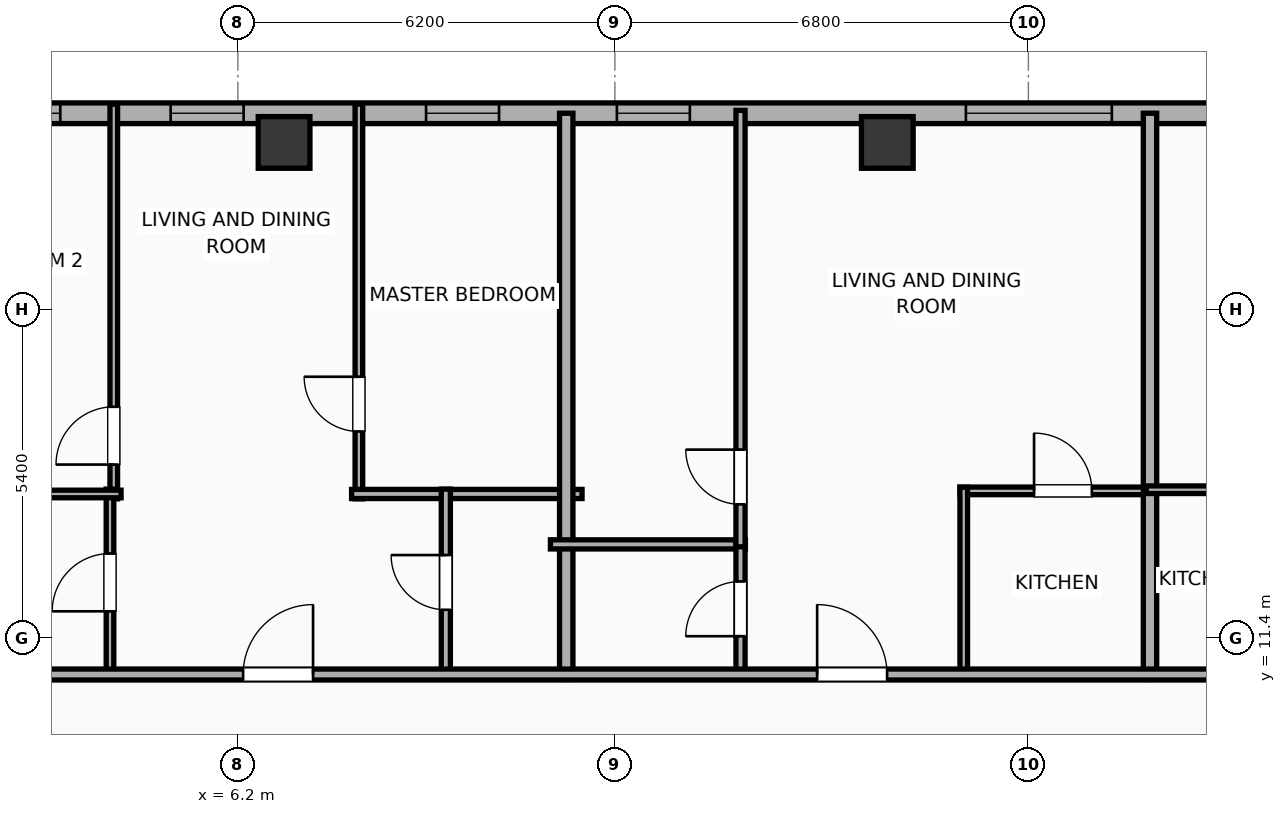
"""IFC4 building model, lengths in metres.
Left out: names, types, materials, properties, quantities, classifications, styles, units other than length and angle.
Written with IfcOpenShell. Run it as: python <this file> out.ifc"""

import sys

from ifc_helpers import new_model, si_unit, direction, frame, frame_2d, origin, origin_2d, place, context, subcontext, project, spatial, rectangle, hollow_rectangle, extrude, element, fill, save


model = new_model("IFC4")
c1 = context("Model", 3, precision=1e-05, world=origin(), true_north=direction((0.0, 1.0)))
c2 = subcontext(c1, "Body", "Model", "MODEL_VIEW")
j1 = project(units=[si_unit("LENGTHUNIT", "METRE"), si_unit("PLANEANGLEUNIT", "RADIAN")], contexts=[c1])
p1 = place(None, origin())
s1 = spatial("IfcSite", under=j1, at=p1, CompositionType="ELEMENT")
p2 = place(p1, origin())
s2 = spatial("IfcBuilding", under=s1, at=p2, CompositionType="ELEMENT")
p3 = place(p2, frame((0.0, 0.0, 223.6)))
s3 = spatial("IfcBuildingStorey", under=s2, at=p3, CompositionType="ELEMENT", Elevation=223.6)
for number, where, z_axis, x_axis in (
    (1, (16.88, 19.55, 0.0), (0.0, 0.0, 1.0), (1.0, 0.0, 0.0)),
    (2, (6.96, 19.55, 0.0), (0.0, 0.0, 1.0), (1.0, 0.0, 0.0)),
):
    element("IfcColumn", number, at=place(p3, frame(where, z_axis=z_axis, x_axis=x_axis)), inside=s3, PredefinedType="COLUMN", context=c2, shape_type="SweptSolid", body=[
        extrude(hollow_rectangle(XDim=0.85, YDim=0.85, WallThickness=0.028, at=origin_2d()), origin(), (0.0, 0.0, 1.0), 3.9),
    ])
p4 = place(p3, frame((-22.783, 20.03, 0.0), z_axis=(0.0, 0.0, 1.0), x_axis=(1.0, 0.0, 0.0)))
e3 = element("IfcWall", 3, at=p4, inside=s3, PredefinedType="ELEMENTEDWALL", context=c2, shape_type="SweptSolid", body=[
    extrude(rectangle(XDim=49.566, YDim=0.34, at=frame_2d((24.783, 0.0))), origin(), (0.0, 0.0, 1.0), 3.65),
])
p5 = place(p4, frame((40.956, 0.0, 0.75)))
e4 = element("IfcOpeningElement", 4, at=p5, cuts=e3, PredefinedType="OPENING", context=c2, shape_type="SweptSolid", body=[
    extrude(rectangle(XDim=2.4, YDim=2.1, at=frame_2d((1.2, 1.05))), frame((0.0, 0.18, 0.0), z_axis=(0.0, -1.0, 0.0), x_axis=(1.0, 0.0, 0.0)), (0.0, 0.0, 1.0), 0.36),
])
p6 = place(p4, frame((1.437, 0.0, 0.75)))
e5 = element("IfcOpeningElement", 5, at=p6, cuts=e3, PredefinedType="OPENING", context=c2, shape_type="SweptSolid", body=[
    extrude(rectangle(XDim=1.2, YDim=2.05, at=frame_2d((0.6, 1.025))), frame((0.0, 0.18, 0.0), z_axis=(0.0, -1.0, 0.0), x_axis=(1.0, 0.0, 0.0)), (0.0, 0.0, 1.0), 0.36),
])
p7 = place(p4, frame((7.619, 0.0, 0.75)))
e6 = element("IfcOpeningElement", 6, at=p7, cuts=e3, PredefinedType="OPENING", context=c2, shape_type="SweptSolid", body=[
    extrude(rectangle(XDim=1.2, YDim=2.05, at=frame_2d((0.6, 1.025))), frame((0.0, 0.18, 0.0), z_axis=(0.0, -1.0, 0.0), x_axis=(1.0, 0.0, 0.0)), (0.0, 0.0, 1.0), 0.36),
])
p8 = place(p4, frame((4.124, 0.0, 0.75)))
e7 = element("IfcOpeningElement", 7, at=p8, cuts=e3, PredefinedType="OPENING", context=c2, shape_type="SweptSolid", body=[
    extrude(rectangle(XDim=1.2, YDim=2.05, at=frame_2d((0.6, 1.025))), frame((0.0, 0.18, 0.0), z_axis=(0.0, -1.0, 0.0), x_axis=(1.0, 0.0, 0.0)), (0.0, 0.0, 1.0), 0.36),
])
p9 = place(p4, frame((11.278, 0.0, 0.75)))
e8 = element("IfcOpeningElement", 8, at=p9, cuts=e3, PredefinedType="OPENING", context=c2, shape_type="SweptSolid", body=[
    extrude(rectangle(XDim=1.2, YDim=2.05, at=frame_2d((0.6, 1.025))), frame((0.0, 0.18, 0.0), z_axis=(0.0, -1.0, 0.0), x_axis=(1.0, 0.0, 0.0)), (0.0, 0.0, 1.0), 0.36),
])
p10 = place(p4, frame((17.953, 0.0, 0.75)))
e9 = element("IfcOpeningElement", 9, at=p10, cuts=e3, PredefinedType="OPENING", context=c2, shape_type="SweptSolid", body=[
    extrude(rectangle(XDim=1.2, YDim=2.05, at=frame_2d((0.6, 1.025))), frame((0.0, 0.18, 0.0), z_axis=(0.0, -1.0, 0.0), x_axis=(1.0, 0.0, 0.0)), (0.0, 0.0, 1.0), 0.36),
])
p11 = place(p4, frame((14.738, 0.0, 0.75)))
e10 = element("IfcOpeningElement", 10, at=p11, cuts=e3, PredefinedType="OPENING", context=c2, shape_type="SweptSolid", body=[
    extrude(rectangle(XDim=1.2, YDim=2.05, at=frame_2d((0.6, 1.025))), frame((0.0, 0.18, 0.0), z_axis=(0.0, -1.0, 0.0), x_axis=(1.0, 0.0, 0.0)), (0.0, 0.0, 1.0), 0.36),
])
p12 = place(p4, frame((21.878, 0.0, 0.75)))
e11 = element("IfcOpeningElement", 11, at=p12, cuts=e3, PredefinedType="OPENING", context=c2, shape_type="SweptSolid", body=[
    extrude(rectangle(XDim=1.2, YDim=2.05, at=frame_2d((0.6, 1.025))), frame((0.0, 0.18, 0.0), z_axis=(0.0, -1.0, 0.0), x_axis=(1.0, 0.0, 0.0)), (0.0, 0.0, 1.0), 0.36),
])
p13 = place(p4, frame((27.878, 0.0, 0.75)))
e12 = element("IfcOpeningElement", 12, at=p13, cuts=e3, PredefinedType="OPENING", context=c2, shape_type="SweptSolid", body=[
    extrude(rectangle(XDim=1.2, YDim=2.05, at=frame_2d((0.6, 1.025))), frame((0.0, 0.18, 0.0), z_axis=(0.0, -1.0, 0.0), x_axis=(1.0, 0.0, 0.0)), (0.0, 0.0, 1.0), 0.36),
])
p14 = place(p4, frame((24.863, 0.0, 0.75)))
e13 = element("IfcOpeningElement", 13, at=p14, cuts=e3, PredefinedType="OPENING", context=c2, shape_type="SweptSolid", body=[
    extrude(rectangle(XDim=1.2, YDim=2.05, at=frame_2d((0.6, 1.025))), frame((0.0, 0.18, 0.0), z_axis=(0.0, -1.0, 0.0), x_axis=(1.0, 0.0, 0.0)), (0.0, 0.0, 1.0), 0.36),
])
p15 = place(p4, frame((32.078, 0.0, 0.75)))
e14 = element("IfcOpeningElement", 14, at=p15, cuts=e3, PredefinedType="OPENING", context=c2, shape_type="SweptSolid", body=[
    extrude(rectangle(XDim=1.2, YDim=2.05, at=frame_2d((0.6, 1.025))), frame((0.0, 0.18, 0.0), z_axis=(0.0, -1.0, 0.0), x_axis=(1.0, 0.0, 0.0)), (0.0, 0.0, 1.0), 0.36),
])
p16 = place(p4, frame((35.216, 0.0, 0.75)))
e15 = element("IfcOpeningElement", 15, at=p16, cuts=e3, PredefinedType="OPENING", context=c2, shape_type="SweptSolid", body=[
    extrude(rectangle(XDim=1.2, YDim=2.05, at=frame_2d((0.6, 1.025))), frame((0.0, 0.18, 0.0), z_axis=(0.0, -1.0, 0.0), x_axis=(1.0, 0.0, 0.0)), (0.0, 0.0, 1.0), 0.36),
])
p17 = place(p4, frame((45.73, 0.0, 0.75)))
e16 = element("IfcOpeningElement", 16, at=p17, cuts=e3, PredefinedType="OPENING", context=c2, shape_type="SweptSolid", body=[
    extrude(rectangle(XDim=1.2, YDim=2.05, at=frame_2d((0.6, 1.025))), frame((0.0, 0.18, 0.0), z_axis=(0.0, -1.0, 0.0), x_axis=(1.0, 0.0, 0.0)), (0.0, 0.0, 1.0), 0.36),
])
p18 = place(p3, frame((4.159, 13.689, 0.0), z_axis=(0.0, 0.0, 1.0), x_axis=(0.0, 1.0, 0.0)))
e17 = element("IfcWall", 17, at=p18, inside=s3, PredefinedType="PARTITIONING", context=c2, shape_type="SweptSolid", body=[
    extrude(rectangle(XDim=6.491, YDim=0.125, at=frame_2d((3.246, 0.0))), origin(), (0.0, 0.0, 1.0), 3.65),
])
p19 = place(p18, frame((0.564, 0.0, 0.0)))
e18 = element("IfcOpeningElement", 18, at=p19, cuts=e17, PredefinedType="OPENING", context=c2, shape_type="SweptSolid", body=[
    extrude(rectangle(XDim=0.95, YDim=2.05, at=frame_2d((0.475, 1.025))), frame((0.0, 0.073, 0.0), z_axis=(0.0, -1.0, 0.0), x_axis=(1.0, 0.0, 0.0)), (0.0, 0.0, 1.0), 0.145),
])
p20 = place(p3, frame((8.19, 13.689, 0.0), z_axis=(0.0, 0.0, 1.0), x_axis=(0.0, 1.0, 0.0)))
e19 = element("IfcWall", 19, at=p20, inside=s3, PredefinedType="PARTITIONING", context=c2, shape_type="SweptSolid", body=[
    extrude(rectangle(XDim=6.491, YDim=0.125, at=frame_2d((3.246, 0.0))), origin(), (0.0, 0.0, 1.0), 3.65),
])
p21 = place(p20, frame((1.108, 0.0, 0.0)))
e20 = element("IfcOpeningElement", 20, at=p21, cuts=e19, PredefinedType="OPENING", context=c2, shape_type="SweptSolid", body=[
    extrude(rectangle(XDim=0.9, YDim=2.05, at=frame_2d((0.45, 1.025))), frame((0.0, 0.073, 0.0), z_axis=(0.0, -1.0, 0.0), x_axis=(1.0, 0.0, 0.0)), (0.0, 0.0, 1.0), 0.145),
])
p22 = place(p3, frame((8.07, 13.769, 0.0), z_axis=(0.0, 0.0, 1.0), x_axis=(1.0, 0.0, 0.0)))
e21 = element("IfcWall", 21, at=p22, inside=s3, PredefinedType="PLUMBINGWALL", context=c2, shape_type="SweptSolid", body=[
    extrude(rectangle(XDim=3.79, YDim=0.15, at=frame_2d((1.895, 0.0))), origin(), (0.0, 0.0, 1.0), 3.65),
])
p23 = place(p3, frame((4.097, 10.78, 0.0), z_axis=(0.0, 0.0, 1.0), x_axis=(0.0, 1.0, 0.0)))
e22 = element("IfcWall", 22, at=p23, inside=s3, PredefinedType="PARTITIONING", context=c2, shape_type="SweptSolid", body=[
    extrude(rectangle(XDim=3.069, YDim=0.125, at=frame_2d((1.535, 0.0))), origin(), (0.0, 0.0, 1.0), 3.65),
])
p24 = place(p23, frame((1.06, 0.0, 0.0)))
e23 = element("IfcOpeningElement", 23, at=p24, cuts=e22, PredefinedType="OPENING", context=c2, shape_type="SweptSolid", body=[
    extrude(rectangle(XDim=0.95, YDim=2.05, at=frame_2d((0.475, 1.025))), frame((0.0, 0.073, 0.0), z_axis=(0.0, -1.0, 0.0), x_axis=(1.0, 0.0, 0.0)), (0.0, 0.0, 1.0), 0.145),
])
p25 = place(p3, frame((0.94, 13.769, 0.0), z_axis=(0.0, 0.0, 1.0), x_axis=(1.0, 0.0, 0.0)))
e24 = element("IfcWall", 24, at=p25, inside=s3, PredefinedType="PARTITIONING", context=c2, shape_type="SweptSolid", body=[
    extrude(rectangle(XDim=3.339, YDim=0.125, at=frame_2d((1.669, 0.0))), origin(), (0.0, 0.0, 1.0), 3.65),
])
p26 = place(p3, frame((9.62, 10.78, 0.0), z_axis=(0.0, 0.0, 1.0), x_axis=(0.0, 1.0, 0.0)))
e25 = element("IfcWall", 25, at=p26, inside=s3, PredefinedType="PLUMBINGWALL", context=c2, shape_type="SweptSolid", body=[
    extrude(rectangle(XDim=3.069, YDim=0.15, at=frame_2d((1.535, 0.0))), origin(), (0.0, 0.0, 1.0), 3.65),
])
p27 = place(p26, frame((1.084, 0.0, 0.0)))
e26 = element("IfcOpeningElement", 26, at=p27, cuts=e25, PredefinedType="OPENING", context=c2, shape_type="SweptSolid", body=[
    extrude(rectangle(XDim=0.9, YDim=2.05, at=frame_2d((0.45, 1.025))), frame((0.0, 0.085, 0.0), z_axis=(0.0, -1.0, 0.0), x_axis=(1.0, 0.0, 0.0)), (0.0, 0.0, 1.0), 0.17),
])
p28 = place(p3, frame((11.6, 10.72, 0.0), z_axis=(0.0, 0.0, 1.0), x_axis=(0.0, 1.0, 0.0)))
e27 = element("IfcWall", 27, at=p28, inside=s3, PredefinedType="PARTITIONING", context=c2, shape_type="SweptSolid", body=[
    extrude(rectangle(XDim=9.31, YDim=0.22, at=frame_2d((4.655, 0.0))), origin(), (0.0, 0.0, 1.0), 3.65),
])
p29 = place(p3, frame((11.34, 12.94, 0.0), z_axis=(0.0, 0.0, 1.0), x_axis=(1.0, 0.0, 0.0)))
e28 = element("IfcWall", 28, at=p29, inside=s3, PredefinedType="PLUMBINGWALL", context=c2, shape_type="SweptSolid", body=[
    extrude(rectangle(XDim=3.206, YDim=0.15, at=frame_2d((1.603, 0.0))), origin(), (0.0, 0.0, 1.0), 3.65),
])
p30 = place(p3, frame((14.466, 10.78, 0.0), z_axis=(0.0, 0.0, 1.0), x_axis=(0.0, 1.0, 0.0)))
e29 = element("IfcWall", 29, at=p30, inside=s3, PredefinedType="PLUMBINGWALL", context=c2, shape_type="SweptSolid", body=[
    extrude(rectangle(XDim=2.2, YDim=0.15, at=frame_2d((1.1, 0.0))), origin(), (0.0, 0.0, 1.0), 3.65),
])
p31 = place(p30, frame((0.65, 0.0, 0.0)))
e30 = element("IfcOpeningElement", 30, at=p31, cuts=e29, PredefinedType="OPENING", context=c2, shape_type="SweptSolid", body=[
    extrude(rectangle(XDim=0.9, YDim=2.05, at=frame_2d((0.45, 1.025))), frame((0.0, 0.085, 0.0), z_axis=(0.0, -1.0, 0.0), x_axis=(1.0, 0.0, 0.0)), (0.0, 0.0, 1.0), 0.17),
])
p32 = place(p3, frame((14.466, 12.9, 0.0), z_axis=(0.0, 0.0, 1.0), x_axis=(0.0, 1.0, 0.0)))
e31 = element("IfcWall", 31, at=p32, inside=s3, PredefinedType="PLUMBINGWALL", context=c2, shape_type="SweptSolid", body=[
    extrude(rectangle(XDim=7.177, YDim=0.15, at=frame_2d((3.588, 0.0))), origin(), (0.0, 0.0, 1.0), 3.65),
])
p33 = place(p32, frame((0.698, 0.0, 0.0)))
e32 = element("IfcOpeningElement", 32, at=p33, cuts=e31, PredefinedType="OPENING", context=c2, shape_type="SweptSolid", body=[
    extrude(rectangle(XDim=0.9, YDim=2.05, at=frame_2d((0.45, 1.025))), frame((0.0, 0.085, 0.0), z_axis=(0.0, -1.0, 0.0), x_axis=(1.0, 0.0, 0.0)), (0.0, 0.0, 1.0), 0.17),
])
p34 = place(p3, frame((18.077, 13.82, 0.0), z_axis=(0.0, 0.0, 1.0), x_axis=(1.0, 0.0, 0.0)))
e33 = element("IfcWall", 33, at=p34, inside=s3, PredefinedType="PARTITIONING", context=c2, shape_type="SweptSolid", body=[
    extrude(rectangle(XDim=3.186, YDim=0.125, at=frame_2d((1.593, 0.0))), origin(), (0.0, 0.0, 1.0), 3.65),
])
p35 = place(p34, frame((1.217, 0.0, 0.0)))
e34 = element("IfcOpeningElement", 34, at=p35, cuts=e33, PredefinedType="OPENING", context=c2, shape_type="SweptSolid", body=[
    extrude(rectangle(XDim=0.95, YDim=2.05, at=frame_2d((0.475, 1.025))), frame((0.0, 0.073, 0.0), z_axis=(0.0, -1.0, 0.0), x_axis=(1.0, 0.0, 0.0)), (0.0, 0.0, 1.0), 0.145),
])
p36 = place(p3, frame((18.137, 10.78, 0.0), z_axis=(0.0, 0.0, 1.0), x_axis=(0.0, 1.0, 0.0)))
e35 = element("IfcWall", 35, at=p36, inside=s3, PredefinedType="PARTITIONING", context=c2, shape_type="SweptSolid", body=[
    extrude(rectangle(XDim=3.1, YDim=0.125, at=frame_2d((1.55, 0.0))), origin(), (0.0, 0.0, 1.0), 3.65),
])
p37 = place(p3, frame((21.2, 10.72, 0.0), z_axis=(0.0, 0.0, 1.0), x_axis=(0.0, 1.0, 0.0)))
e36 = element("IfcWall", 36, at=p37, inside=s3, PredefinedType="PARTITIONING", context=c2, shape_type="SweptSolid", body=[
    extrude(rectangle(XDim=9.31, YDim=0.22, at=frame_2d((4.655, 0.0))), origin(), (0.0, 0.0, 1.0), 3.65),
])
p38 = place(p3, frame((21.137, 13.839, 0.0), z_axis=(0.0, 0.0, 1.0), x_axis=(1.0, 0.0, 0.0)))
e37 = element("IfcWall", 37, at=p38, inside=s3, PredefinedType="PARTITIONING", context=c2, shape_type="SweptSolid", body=[
    extrude(rectangle(XDim=2.667, YDim=0.125, at=frame_2d((1.333, 0.0))), origin(), (0.0, 0.0, 1.0), 3.65),
])
p39 = place(p3, frame((-26.23, 10.8, 0.0), z_axis=(0.0, 0.0, 1.0), x_axis=(1.0, 0.0, 0.0)))
e38 = element("IfcWall", 38, at=p39, inside=s3, PredefinedType="PARTITIONING", context=c2, shape_type="SweptSolid", body=[
    extrude(rectangle(XDim=56.46, YDim=0.18, at=frame_2d((28.23, 0.0))), origin(), (0.0, 0.0, 1.0), 3.65),
])
p40 = place(p39, frame((2.994, 0.0, 0.0)))
e39 = element("IfcOpeningElement", 39, at=p40, cuts=e38, PredefinedType="OPENING", context=c2, shape_type="SweptSolid", body=[
    extrude(rectangle(XDim=0.9, YDim=2.05, at=frame_2d((0.45, 1.025))), frame((0.0, 0.1, 0.0), z_axis=(0.0, -1.0, 0.0), x_axis=(1.0, 0.0, 0.0)), (0.0, 0.0, 1.0), 0.2),
])
p41 = place(p39, frame((11.745, 0.0, 0.0)))
e40 = element("IfcOpeningElement", 40, at=p41, cuts=e38, PredefinedType="OPENING", context=c2, shape_type="SweptSolid", body=[
    extrude(rectangle(XDim=1.15, YDim=2.05, at=frame_2d((0.575, 1.025))), frame((0.0, 0.1, 0.0), z_axis=(0.0, -1.0, 0.0), x_axis=(1.0, 0.0, 0.0)), (0.0, 0.0, 1.0), 0.2),
])
p42 = place(p39, frame((21.907, 0.0, 0.0)))
e41 = element("IfcOpeningElement", 41, at=p42, cuts=e38, PredefinedType="OPENING", context=c2, shape_type="SweptSolid", body=[
    extrude(rectangle(XDim=1.15, YDim=2.05, at=frame_2d((0.575, 1.025))), frame((0.0, 0.1, 0.0), z_axis=(0.0, -1.0, 0.0), x_axis=(1.0, 0.0, 0.0)), (0.0, 0.0, 1.0), 0.2),
])
p43 = place(p39, frame((32.516, 0.0, 0.0)))
e42 = element("IfcOpeningElement", 42, at=p43, cuts=e38, PredefinedType="OPENING", context=c2, shape_type="SweptSolid", body=[
    extrude(rectangle(XDim=1.15, YDim=2.05, at=frame_2d((0.575, 1.025))), frame((0.0, 0.1, 0.0), z_axis=(0.0, -1.0, 0.0), x_axis=(1.0, 0.0, 0.0)), (0.0, 0.0, 1.0), 0.2),
])
p44 = place(p39, frame((41.956, 0.0, 0.0)))
e43 = element("IfcOpeningElement", 43, at=p44, cuts=e38, PredefinedType="OPENING", context=c2, shape_type="SweptSolid", body=[
    extrude(rectangle(XDim=1.15, YDim=2.05, at=frame_2d((0.575, 1.025))), frame((0.0, 0.1, 0.0), z_axis=(0.0, -1.0, 0.0), x_axis=(1.0, 0.0, 0.0)), (0.0, 0.0, 1.0), 0.2),
])
p45 = place(p39, frame((51.656, 0.0, 0.0)))
e44 = element("IfcOpeningElement", 44, at=p45, cuts=e38, PredefinedType="OPENING", context=c2, shape_type="SweptSolid", body=[
    extrude(rectangle(XDim=1.15, YDim=2.05, at=frame_2d((0.575, 1.025))), frame((0.0, 0.1, 0.0), z_axis=(0.0, -1.0, 0.0), x_axis=(1.0, 0.0, 0.0)), (0.0, 0.0, 1.0), 0.2),
])
p46 = place(p5, origin())
e45 = element("IfcWindow", 45, at=p46, inside=s3, PartitioningType="SINGLE_PANEL", PredefinedType="WINDOW", context=c2, shape_type="SweptSolid", body=[
    extrude(rectangle(XDim=2.4, YDim=2.1, at=frame_2d((1.2, 1.05))), frame((0.0, 0.03, 0.0), z_axis=(0.0, -1.0, 0.0), x_axis=(1.0, 0.0, 0.0)), (0.0, 0.0, 1.0), 0.06),
])
fill(e4, e45)
p47 = place(p13, origin())
e46 = element("IfcWindow", 46, at=p47, inside=s3, PartitioningType="SINGLE_PANEL", PredefinedType="WINDOW", context=c2, shape_type="SweptSolid", body=[
    extrude(rectangle(XDim=1.2, YDim=2.05, at=frame_2d((0.6, 1.025))), frame((0.0, 0.03, 0.0), z_axis=(0.0, -1.0, 0.0), x_axis=(1.0, 0.0, 0.0)), (0.0, 0.0, 1.0), 0.06),
])
fill(e12, e46)
p48 = place(p14, origin())
e47 = element("IfcWindow", 47, at=p48, inside=s3, PartitioningType="SINGLE_PANEL", PredefinedType="WINDOW", context=c2, shape_type="SweptSolid", body=[
    extrude(rectangle(XDim=1.2, YDim=2.05, at=frame_2d((0.6, 1.025))), frame((0.0, 0.03, 0.0), z_axis=(0.0, -1.0, 0.0), x_axis=(1.0, 0.0, 0.0)), (0.0, 0.0, 1.0), 0.06),
])
fill(e13, e47)
p49 = place(p15, origin())
e48 = element("IfcWindow", 48, at=p49, inside=s3, PartitioningType="SINGLE_PANEL", PredefinedType="WINDOW", context=c2, shape_type="SweptSolid", body=[
    extrude(rectangle(XDim=1.2, YDim=2.05, at=frame_2d((0.6, 1.025))), frame((0.0, 0.03, 0.0), z_axis=(0.0, -1.0, 0.0), x_axis=(1.0, 0.0, 0.0)), (0.0, 0.0, 1.0), 0.06),
])
fill(e14, e48)
p50 = place(p16, origin())
e49 = element("IfcWindow", 49, at=p50, inside=s3, PartitioningType="SINGLE_PANEL", PredefinedType="WINDOW", context=c2, shape_type="SweptSolid", body=[
    extrude(rectangle(XDim=1.2, YDim=2.05, at=frame_2d((0.6, 1.025))), frame((0.0, 0.03, 0.0), z_axis=(0.0, -1.0, 0.0), x_axis=(1.0, 0.0, 0.0)), (0.0, 0.0, 1.0), 0.06),
])
fill(e15, e49)
p51 = place(p19, origin())
e50 = element("IfcDoor", 50, at=p51, inside=s3, OperationType="SINGLE_SWING_LEFT", PredefinedType="DOOR", context=c2, shape_type="SweptSolid", body=[
    extrude(rectangle(XDim=0.95, YDim=2.05, at=frame_2d((0.475, 1.025))), frame((0.0, 0.025, 0.0), z_axis=(0.0, -1.0, 0.0), x_axis=(1.0, 0.0, 0.0)), (0.0, 0.0, 1.0), 0.05),
])
fill(e18, e50)
p52 = place(p21, origin())
e51 = element("IfcDoor", 51, at=p52, inside=s3, OperationType="SINGLE_SWING_RIGHT", PredefinedType="DOOR", context=c2, shape_type="SweptSolid", body=[
    extrude(rectangle(XDim=0.9, YDim=2.05, at=frame_2d((0.45, 1.025))), frame((0.0, 0.025, 0.0), z_axis=(0.0, -1.0, 0.0), x_axis=(1.0, 0.0, 0.0)), (0.0, 0.0, 1.0), 0.05),
])
fill(e20, e51)
p53 = place(p24, origin())
e52 = element("IfcDoor", 52, at=p53, inside=s3, OperationType="SINGLE_SWING_LEFT", PredefinedType="DOOR", context=c2, shape_type="SweptSolid", body=[
    extrude(rectangle(XDim=0.95, YDim=2.05, at=frame_2d((0.475, 1.025))), frame((0.0, 0.025, 0.0), z_axis=(0.0, -1.0, 0.0), x_axis=(1.0, 0.0, 0.0)), (0.0, 0.0, 1.0), 0.05),
])
fill(e23, e52)
p54 = place(p27, origin())
e53 = element("IfcDoor", 53, at=p54, inside=s3, OperationType="SINGLE_SWING_RIGHT", PredefinedType="DOOR", context=c2, shape_type="SweptSolid", body=[
    extrude(rectangle(XDim=0.9, YDim=2.05, at=frame_2d((0.45, 1.025))), frame((0.0, 0.025, 0.0), z_axis=(0.0, -1.0, 0.0), x_axis=(1.0, 0.0, 0.0)), (0.0, 0.0, 1.0), 0.05),
])
fill(e26, e53)
p55 = place(p31, origin())
e54 = element("IfcDoor", 54, at=p55, inside=s3, OperationType="SINGLE_SWING_LEFT", PredefinedType="DOOR", context=c2, shape_type="SweptSolid", body=[
    extrude(rectangle(XDim=0.9, YDim=2.05, at=frame_2d((0.45, 1.025))), frame((0.0, 0.025, 0.0), z_axis=(0.0, -1.0, 0.0), x_axis=(1.0, 0.0, 0.0)), (0.0, 0.0, 1.0), 0.05),
])
fill(e30, e54)
p56 = place(p33, origin())
e55 = element("IfcDoor", 55, at=p56, inside=s3, OperationType="SINGLE_SWING_RIGHT", PredefinedType="DOOR", context=c2, shape_type="SweptSolid", body=[
    extrude(rectangle(XDim=0.9, YDim=2.05, at=frame_2d((0.45, 1.025))), frame((0.0, 0.025, 0.0), z_axis=(0.0, -1.0, 0.0), x_axis=(1.0, 0.0, 0.0)), (0.0, 0.0, 1.0), 0.05),
])
fill(e32, e55)
p57 = place(p35, origin())
e56 = element("IfcDoor", 56, at=p57, inside=s3, OperationType="SINGLE_SWING_LEFT", PredefinedType="DOOR", context=c2, shape_type="SweptSolid", body=[
    extrude(rectangle(XDim=0.95, YDim=2.05, at=frame_2d((0.475, 1.025))), frame((0.0, 0.025, 0.0), z_axis=(0.0, -1.0, 0.0), x_axis=(1.0, 0.0, 0.0)), (0.0, 0.0, 1.0), 0.05),
])
fill(e34, e56)
p58 = place(p43, origin())
e57 = element("IfcDoor", 57, at=p58, inside=s3, OperationType="SINGLE_SWING_RIGHT", PredefinedType="DOOR", context=c2, shape_type="SweptSolid", body=[
    extrude(rectangle(XDim=1.15, YDim=2.05, at=frame_2d((0.575, 1.025))), frame((0.0, 0.025, 0.0), z_axis=(0.0, -1.0, 0.0), x_axis=(1.0, 0.0, 0.0)), (0.0, 0.0, 1.0), 0.05),
])
fill(e42, e57)
p59 = place(p44, origin())
e58 = element("IfcDoor", 58, at=p59, inside=s3, OperationType="SINGLE_SWING_LEFT", PredefinedType="DOOR", context=c2, shape_type="SweptSolid", body=[
    extrude(rectangle(XDim=1.15, YDim=2.05, at=frame_2d((0.575, 1.025))), frame((0.0, 0.025, 0.0), z_axis=(0.0, -1.0, 0.0), x_axis=(1.0, 0.0, 0.0)), (0.0, 0.0, 1.0), 0.05),
])
fill(e43, e58)
save(model, sys.argv[1])
